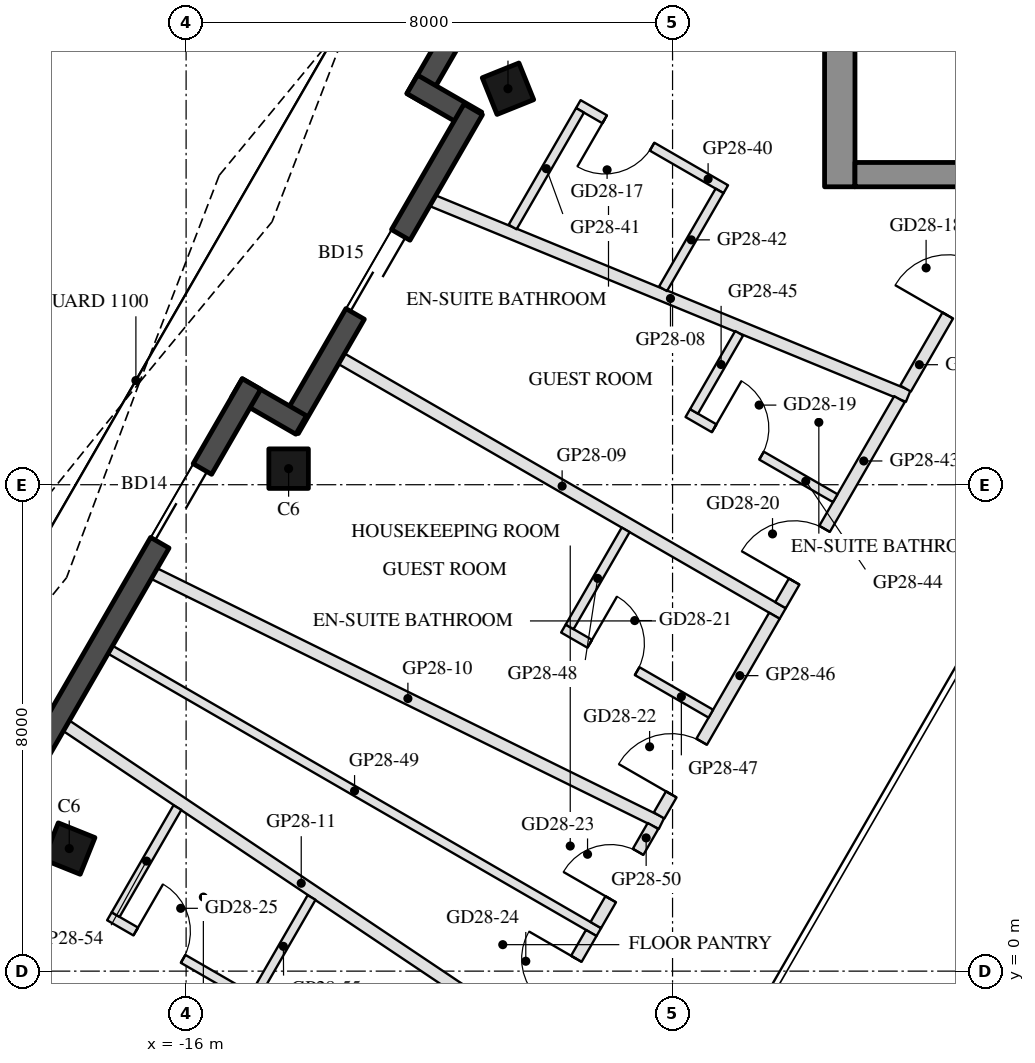
"""IFC4 building model, lengths in metres.
Left out: names, types, materials, properties, quantities, classifications, styles, units other than length and angle.
Written with IfcOpenShell. Run it as: python <this file> out.ifc"""

import sys

from ifc_helpers import new_model, si_unit, direction, frame, frame_2d, origin, origin_2d, place, context, subcontext, project, spatial, rectangle, hollow_rectangle, extrude, boolean, halfspace, element, fill, save


model = new_model("IFC4")
c1 = context("Model", 3, precision=1e-05, world=origin(), true_north=direction((0.0, 1.0)))
c2 = subcontext(c1, "Body", "Model", "MODEL_VIEW")
j1 = project(units=[si_unit("LENGTHUNIT", "METRE"), si_unit("PLANEANGLEUNIT", "RADIAN")], contexts=[c1])
p1 = place(None, origin())
s1 = spatial("IfcSite", under=j1, at=p1, CompositionType="ELEMENT")
p2 = place(p1, origin())
s2 = spatial("IfcBuilding", under=s1, at=p2, CompositionType="ELEMENT")
p3 = place(p2, frame((0.0, 0.0, 287.4)))
s3 = spatial("IfcBuildingStorey", under=s2, at=p3, CompositionType="ELEMENT", Elevation=287.4)
p4 = place(p3, frame((-10.707, 14.513, 0.0), z_axis=(0.100511564979, -0.128308480942, 0.986627771261), x_axis=(0.503128985572, 0.862066140583, 0.060853867073)))
e1 = element("IfcColumn", 1, at=p4, inside=s3, PredefinedType="COLUMN", context=c2, shape_type="SweptSolid", body=[
    boolean("DIFFERENCE", boolean("DIFFERENCE", extrude(hollow_rectangle(XDim=0.65, YDim=0.65, WallThickness=0.03, at=origin_2d()), origin(), (0.0, 0.0, 1.0), 3.75), halfspace(frame((0.0, 0.0, 0.04), z_axis=(0.0, 0.0, 1.0), x_axis=(1.0, 0.0, 0.0)), True)), halfspace(frame((0.0, 0.0, 3.711), z_axis=(0.0, 0.0, 1.0), x_axis=(1.0, 0.0, 0.0)), False)),
])
p5 = place(p3, frame((-14.314, 8.264, 0.0), z_axis=(0.13115563542, -0.07578460883, 0.988460870425), x_axis=(0.500216662803, 0.86590027717, 1.5862574e-05)))
e2 = element("IfcColumn", 2, at=p5, inside=s3, PredefinedType="COLUMN", context=c2, shape_type="SweptSolid", body=[
    boolean("DIFFERENCE", boolean("DIFFERENCE", extrude(hollow_rectangle(XDim=0.65, YDim=0.65, WallThickness=0.03, at=origin_2d()), origin(), (0.0, 0.0, 1.0), 3.743), halfspace(frame((0.0, 0.0, 0.037), z_axis=(0.0, 0.0, 1.0), x_axis=(1.0, 0.0, 0.0)), True)), halfspace(frame((0.0, 0.0, 3.706), z_axis=(0.0, 0.0, 1.0), x_axis=(1.0, 0.0, 0.0)), False)),
])
p6 = place(p3, frame((-17.922, 2.016, 0.0), z_axis=(0.161441555696, -0.022914285325, 0.986616216987), x_axis=(-0.49507293815, -0.866715878813, 0.060879974747)))
e3 = element("IfcColumn", 3, at=p6, inside=s3, PredefinedType="COLUMN", context=c2, shape_type="SweptSolid", body=[
    boolean("DIFFERENCE", boolean("DIFFERENCE", extrude(hollow_rectangle(XDim=0.65, YDim=0.65, WallThickness=0.03, at=origin_2d()), origin(), (0.0, 0.0, 1.0), 3.75), halfspace(frame((0.0, 0.0, 0.04), z_axis=(0.0, 0.0, 1.0), x_axis=(1.0, 0.0, 0.0)), True)), halfspace(frame((0.0, 0.0, 3.711), z_axis=(0.0, 0.0, 1.0), x_axis=(1.0, 0.0, 0.0)), False)),
])
p7 = place(p3, frame((-6.783, 23.76, 0.0), z_axis=(0.0, 0.0, 1.0), x_axis=(-0.500001780095, -0.866024376044, 0.0)))
e4 = element("IfcWall", 4, at=p7, inside=s3, PredefinedType="SOLIDWALL", context=c2, shape_type="SweptSolid", body=[
    extrude(rectangle(XDim=10.87, YDim=0.35, at=frame_2d((5.435, 0.0))), origin(), (0.0, 0.0, 1.0), 3.55),
])
p8 = place(p7, frame((0.381, 0.0, 0.3)))
e5 = element("IfcOpeningElement", 5, at=p8, cuts=e4, PredefinedType="OPENING", context=c2, shape_type="SweptSolid", body=[
    extrude(rectangle(XDim=1.6, YDim=2.65, at=frame_2d((0.8, 1.325))), frame((0.0, 0.185, 0.0), z_axis=(0.0, -1.0, 0.0), x_axis=(1.0, 0.0, 0.0)), (0.0, 0.0, 1.0), 0.37),
])
p9 = place(p7, frame((6.89, 0.0, 0.0)))
e6 = element("IfcOpeningElement", 6, at=p9, cuts=e4, PredefinedType="OPENING", context=c2, shape_type="SweptSolid", body=[
    extrude(rectangle(XDim=2.4, YDim=2.4, at=frame_2d((1.2, 1.2))), frame((0.0, 0.185, 0.0), z_axis=(0.0, -1.0, 0.0), x_axis=(1.0, 0.0, 0.0)), (0.0, 0.0, 1.0), 0.37),
])
p10 = place(p7, frame((3.892, 0.0, 0.3)))
e7 = element("IfcOpeningElement", 7, at=p10, cuts=e4, PredefinedType="OPENING", context=c2, shape_type="SweptSolid", body=[
    extrude(rectangle(XDim=2.6, YDim=2.65, at=frame_2d((1.3, 1.325))), frame((0.0, 0.185, 0.0), z_axis=(0.0, -1.0, 0.0), x_axis=(1.0, 0.0, 0.0)), (0.0, 0.0, 1.0), 0.37),
])
p11 = place(p3, frame((-12.281, 14.585, 0.0), z_axis=(0.0, 0.0, 1.0), x_axis=(0.866005645448, -0.500034220881, 0.0)))
e8 = element("IfcWall", 8, at=p11, inside=s3, PredefinedType="SOLIDWALL", context=c2, shape_type="SweptSolid", body=[
    extrude(rectangle(XDim=1.22, YDim=0.35, at=frame_2d((0.61, 0.0))), origin(), (0.0, 0.0, 1.0), 3.55),
])
p12 = place(p3, frame((-11.278, 14.173, 0.0), z_axis=(0.0, 0.0, 1.0), x_axis=(-0.499985371027, -0.866033849661, 0.0)))
e9 = element("IfcWall", 9, at=p12, inside=s3, PredefinedType="SOLIDWALL", context=c2, shape_type="SweptSolid", body=[
    extrude(rectangle(XDim=6.055, YDim=0.35, at=frame_2d((3.028, 0.0))), origin(), (0.0, 0.0, 1.0), 3.55),
])
p13 = place(p12, frame((2.384, 0.0, 0.0)))
e10 = element("IfcOpeningElement", 10, at=p13, cuts=e9, PredefinedType="OPENING", context=c2, shape_type="SweptSolid", body=[
    extrude(rectangle(XDim=1.5, YDim=2.4, at=frame_2d((0.75, 1.2))), frame((0.0, 0.185, 0.0), z_axis=(0.0, -1.0, 0.0), x_axis=(1.0, 0.0, 0.0)), (0.0, 0.0, 1.0), 0.37),
])
p14 = place(p3, frame((-14.108, 8.982, 0.0), z_axis=(0.0, 0.0, 1.0), x_axis=(-0.866005645448, 0.500034220881, 0.0)))
e11 = element("IfcWall", 11, at=p14, inside=s3, PredefinedType="SOLIDWALL", context=c2, shape_type="SweptSolid", body=[
    extrude(rectangle(XDim=1.22, YDim=0.35, at=frame_2d((0.61, 0.0))), origin(), (0.0, 0.0, 1.0), 3.55),
])
p15 = place(p3, frame((-14.925, 9.656, 0.0), z_axis=(0.0, 0.0, 1.0), x_axis=(-0.500018599098, -0.866014665324, 0.0)))
e12 = element("IfcWall", 12, at=p15, inside=s3, PredefinedType="SOLIDWALL", context=c2, shape_type="SweptSolid", body=[
    extrude(rectangle(XDim=9.015, YDim=0.35, at=frame_2d((4.508, 0.0))), origin(), (0.0, 0.0, 1.0), 3.55),
])
p16 = place(p15, frame((1.614, 0.0, 0.0)))
e13 = element("IfcOpeningElement", 13, at=p16, cuts=e12, PredefinedType="OPENING", context=c2, shape_type="SweptSolid", body=[
    extrude(rectangle(XDim=1.4, YDim=2.4, at=frame_2d((0.7, 1.2))), frame((0.0, 0.185, 0.0), z_axis=(0.0, -1.0, 0.0), x_axis=(1.0, 0.0, 0.0)), (0.0, 0.0, 1.0), 0.37),
])
p17 = place(p3, frame((-5.25, 12.9, 0.0), z_axis=(0.0, 0.0, 1.0), x_axis=(0.0, 1.0, 0.0)))
e14 = element("IfcWall", 14, at=p17, inside=s3, PredefinedType="SHEAR", context=c2, shape_type="SweptSolid", body=[
    extrude(rectangle(XDim=12.129, YDim=0.5, at=frame_2d((6.064, 0.0))), origin(), (0.0, 0.0, 1.0), 3.5),
])
p18 = place(p3, frame((5.0, 13.1, 0.0), z_axis=(0.0, 0.0, 1.0), x_axis=(-1.0, 0.0, 0.0)))
e15 = element("IfcWall", 15, at=p18, inside=s3, PredefinedType="SHEAR", context=c2, shape_type="SweptSolid", body=[
    extrude(rectangle(XDim=10.0, YDim=0.4, at=frame_2d((5.0, 0.0))), origin(), (0.0, 0.0, 1.0), 3.5),
])
p19 = place(p18, frame((3.55, 0.0, 0.0)))
e16 = element("IfcOpeningElement", 16, at=p19, cuts=e15, PredefinedType="OPENING", context=c2, shape_type="SweptSolid", body=[
    extrude(rectangle(XDim=1.1, YDim=2.1, at=frame_2d((0.55, 1.05))), frame((0.0, 0.21, 0.0), z_axis=(0.0, -1.0, 0.0), x_axis=(1.0, 0.0, 0.0)), (0.0, 0.0, 1.0), 0.42),
])
p20 = place(p18, frame((5.85, 0.0, 0.0)))
e17 = element("IfcOpeningElement", 17, at=p20, cuts=e15, PredefinedType="OPENING", context=c2, shape_type="SweptSolid", body=[
    extrude(rectangle(XDim=1.4, YDim=2.1, at=frame_2d((0.7, 1.05))), frame((0.0, 0.21, 0.0), z_axis=(0.0, -1.0, 0.0), x_axis=(1.0, 0.0, 0.0)), (0.0, 0.0, 1.0), 0.42),
])
p21 = place(p3, frame((-11.944, 12.67, 0.0), z_axis=(0.0, 0.0, 1.0), x_axis=(0.924897439871, -0.380216682591, 0.0)))
e18 = element("IfcWall", 18, at=p21, inside=s3, PredefinedType="PARTITIONING", context=c2, shape_type="SweptSolid", body=[
    extrude(rectangle(XDim=8.454, YDim=0.2, at=frame_2d((4.227, 0.0))), origin(), (0.0, 0.0, 1.0), 3.1),
])
p22 = place(p3, frame((-13.444, 10.071, 0.0), z_axis=(0.0, 0.0, 1.0), x_axis=(0.866030795796, -0.499990660646, 0.0)))
e19 = element("IfcWall", 19, at=p22, inside=s3, PredefinedType="PARTITIONING", context=c2, shape_type="SweptSolid", body=[
    extrude(rectangle(XDim=8.379, YDim=0.2, at=frame_2d((4.189, 0.0))), origin(), (0.0, 0.0, 1.0), 3.1),
])
p23 = place(p3, frame((-16.524, 6.538, 0.0), z_axis=(0.0, 0.0, 1.0), x_axis=(0.897120251728, -0.441786434762, 0.0)))
e20 = element("IfcWall", 20, at=p23, inside=s3, PredefinedType="PARTITIONING", context=c2, shape_type="SweptSolid", body=[
    extrude(rectangle(XDim=9.299, YDim=0.2, at=frame_2d((4.649, 0.0))), origin(), (0.0, 0.0, 1.0), 3.1),
])
p24 = place(p3, frame((-17.969, 4.035, 0.0), z_axis=(0.0, 0.0, 1.0), x_axis=(0.830560992963, -0.556927676604, 0.0)))
e21 = element("IfcWall", 21, at=p24, inside=s3, PredefinedType="PARTITIONING", context=c2, shape_type="SweptSolid", body=[
    extrude(rectangle(XDim=9.3, YDim=0.2, at=frame_2d((4.65, 0.0))), origin(), (0.0, 0.0, 1.0), 3.1),
])
p25 = place(p3, frame((-4.167, 9.582, 0.0), z_axis=(0.0, 0.0, 1.0), x_axis=(0.500000579621, 0.86602506914, 0.0)))
e22 = element("IfcWall", 22, at=p25, inside=s3, PredefinedType="PARTITIONING", context=c2, shape_type="SweptSolid", body=[
    extrude(rectangle(XDim=3.774, YDim=0.2, at=frame_2d((1.887, 0.0))), origin(), (0.0, 0.0, 1.0), 3.05),
])
p26 = place(p25, frame((1.387, 0.0, 0.0)))
e23 = element("IfcOpeningElement", 23, at=p26, cuts=e22, PredefinedType="OPENING", context=c2, shape_type="SweptSolid", body=[
    extrude(rectangle(XDim=1.0, YDim=2.1, at=frame_2d((0.5, 1.05))), frame((0.0, 0.11, 0.0), z_axis=(0.0, -1.0, 0.0), x_axis=(1.0, 0.0, 0.0)), (0.0, 0.0, 1.0), 0.22),
])
p27 = place(p3, frame((-7.125, 12.86, 0.0), z_axis=(0.0, 0.0, 1.0), x_axis=(-0.866034573852, 0.49998411664, 0.0)))
e24 = element("IfcWall", 24, at=p27, inside=s3, PredefinedType="PARTITIONING", context=c2, shape_type="SweptSolid", body=[
    extrude(rectangle(XDim=2.8, YDim=0.15, at=frame_2d((1.4, 0.0))), origin(), (0.0, 0.0, 1.0), 3.1),
])
p28 = place(p27, frame((1.4, 0.0, 0.0)))
e25 = element("IfcOpeningElement", 25, at=p28, cuts=e24, PredefinedType="OPENING", context=c2, shape_type="SweptSolid", body=[
    extrude(rectangle(XDim=0.9, YDim=2.1, at=frame_2d((0.45, 1.05))), frame((0.0, 0.085, 0.0), z_axis=(0.0, -1.0, 0.0), x_axis=(1.0, 0.0, 0.0)), (0.0, 0.0, 1.0), 0.17),
])
p29 = place(p3, frame((-9.522, 14.158, 0.0), z_axis=(0.0, 0.0, 1.0), x_axis=(-0.49990681678, -0.866079196458, 0.0)))
e26 = element("IfcWall", 26, at=p29, inside=s3, PredefinedType="PARTITIONING", context=c2, shape_type="SweptSolid", body=[
    extrude(rectangle(XDim=2.216, YDim=0.15, at=frame_2d((1.108, 0.0))), origin(), (0.0, 0.0, 1.0), 3.05),
])
p30 = place(p3, frame((-7.227, 12.833, 0.0), z_axis=(0.0, 0.0, 1.0), x_axis=(-0.500063286585, -0.865988862174, 0.0)))
e27 = element("IfcWall", 27, at=p30, inside=s3, PredefinedType="PARTITIONING", context=c2, shape_type="SweptSolid", body=[
    extrude(rectangle(XDim=1.86, YDim=0.15, at=frame_2d((0.93, 0.0))), origin(), (0.0, 0.0, 1.0), 3.05),
])
p31 = place(p3, frame((-6.225, 6.019, 0.0), z_axis=(0.0, 0.0, 1.0), x_axis=(0.500024943202, 0.866011002341, 0.0)))
e28 = element("IfcWall", 28, at=p31, inside=s3, PredefinedType="PARTITIONING", context=c2, shape_type="SweptSolid", body=[
    extrude(rectangle(XDim=3.912, YDim=0.2, at=frame_2d((1.956, 0.0))), origin(), (0.0, 0.0, 1.0), 3.05),
])
p32 = place(p31, frame((0.449, 0.0, 0.0)))
e29 = element("IfcOpeningElement", 29, at=p32, cuts=e28, PredefinedType="OPENING", context=c2, shape_type="SweptSolid", body=[
    extrude(rectangle(XDim=1.0, YDim=2.1, at=frame_2d((0.5, 1.05))), frame((0.0, 0.11, 0.0), z_axis=(0.0, -1.0, 0.0), x_axis=(1.0, 0.0, 0.0)), (0.0, 0.0, 1.0), 0.22),
])
p33 = place(p3, frame((-7.749, 9.178, 0.0), z_axis=(0.0, 0.0, 1.0), x_axis=(0.866034573852, -0.49998411664, 0.0)))
e30 = element("IfcWall", 30, at=p33, inside=s3, PredefinedType="PARTITIONING", context=c2, shape_type="SweptSolid", body=[
    extrude(rectangle(XDim=2.8, YDim=0.15, at=frame_2d((1.4, 0.0))), origin(), (0.0, 0.0, 1.0), 3.55),
])
p34 = place(p33, frame((0.5, 0.0, 0.0)))
e31 = element("IfcOpeningElement", 31, at=p34, cuts=e30, PredefinedType="OPENING", context=c2, shape_type="SweptSolid", body=[
    extrude(rectangle(XDim=0.9, YDim=2.1, at=frame_2d((0.45, 1.05))), frame((0.0, 0.085, 0.0), z_axis=(0.0, -1.0, 0.0), x_axis=(1.0, 0.0, 0.0)), (0.0, 0.0, 1.0), 0.17),
])
p35 = place(p3, frame((-6.905, 10.491, 0.0), z_axis=(0.0, 0.0, 1.0), x_axis=(-0.499926630096, -0.866067759775, 0.0)))
e32 = element("IfcWall", 32, at=p35, inside=s3, PredefinedType="PARTITIONING", context=c2, shape_type="SweptSolid", body=[
    extrude(rectangle(XDim=1.484, YDim=0.15, at=frame_2d((0.742, 0.0))), origin(), (0.0, 0.0, 1.0), 3.55),
])
p36 = place(p3, frame((-8.221, 2.561, 0.0), z_axis=(0.0, 0.0, 1.0), x_axis=(0.499988034227, 0.866032312117, 0.0)))
e33 = element("IfcWall", 33, at=p36, inside=s3, PredefinedType="PARTITIONING", context=c2, shape_type="SweptSolid", body=[
    extrude(rectangle(XDim=3.793, YDim=0.2, at=frame_2d((1.896, 0.0))), origin(), (0.0, 0.0, 1.0), 3.05),
])
p37 = place(p36, frame((0.4, 0.0, 0.0)))
e34 = element("IfcOpeningElement", 34, at=p37, cuts=e33, PredefinedType="OPENING", context=c2, shape_type="SweptSolid", body=[
    extrude(rectangle(XDim=1.0, YDim=2.1, at=frame_2d((0.5, 1.05))), frame((0.0, 0.11, 0.0), z_axis=(0.0, -1.0, 0.0), x_axis=(1.0, 0.0, 0.0)), (0.0, 0.0, 1.0), 0.22),
])
p38 = place(p3, frame((-9.795, 5.634, 0.0), z_axis=(0.0, 0.0, 1.0), x_axis=(0.866034573852, -0.49998411664, 0.0)))
e35 = element("IfcWall", 35, at=p38, inside=s3, PredefinedType="PARTITIONING", context=c2, shape_type="SweptSolid", body=[
    extrude(rectangle(XDim=2.8, YDim=0.15, at=frame_2d((1.4, 0.0))), origin(), (0.0, 0.0, 1.0), 3.05),
])
p39 = place(p38, frame((0.5, 0.0, 0.0)))
e36 = element("IfcOpeningElement", 36, at=p39, cuts=e35, PredefinedType="OPENING", context=c2, shape_type="SweptSolid", body=[
    extrude(rectangle(XDim=0.9, YDim=2.1, at=frame_2d((0.45, 1.05))), frame((0.0, 0.085, 0.0), z_axis=(0.0, -1.0, 0.0), x_axis=(1.0, 0.0, 0.0)), (0.0, 0.0, 1.0), 0.17),
])
p40 = place(p3, frame((-8.771, 7.258, 0.0), z_axis=(0.0, 0.0, 1.0), x_axis=(-0.50002820729, -0.866009117685, 0.0)))
e37 = element("IfcWall", 37, at=p40, inside=s3, PredefinedType="PARTITIONING", context=c2, shape_type="SweptSolid", body=[
    extrude(rectangle(XDim=1.843, YDim=0.15, at=frame_2d((0.922, 0.0))), origin(), (0.0, 0.0, 1.0), 3.05),
])
p41 = place(p3, frame((-17.246, 5.286, 0.0), z_axis=(0.0, 0.0, 1.0), x_axis=(0.865746766399, -0.500482303853, 0.0)))
e38 = element("IfcWall", 38, at=p41, inside=s3, PredefinedType="PARTITIONING", context=c2, shape_type="SweptSolid", body=[
    extrude(rectangle(XDim=9.279, YDim=0.15, at=frame_2d((4.639, 0.0))), origin(), (0.0, 0.0, 1.0), 3.1),
])
p42 = place(p3, frame((-9.262, 0.758, 0.0), z_axis=(0.0, 0.0, 1.0), x_axis=(0.500074377092, 0.865982457891, 0.0)))
e39 = element("IfcWall", 39, at=p42, inside=s3, PredefinedType="PARTITIONING", context=c2, shape_type="SweptSolid", body=[
    extrude(rectangle(XDim=1.882, YDim=0.2, at=frame_2d((0.941, 0.0))), origin(), (0.0, 0.0, 1.0), 3.05),
])
p43 = place(p42, frame((0.491, 0.0, 0.0)))
e40 = element("IfcOpeningElement", 40, at=p43, cuts=e39, PredefinedType="OPENING", context=c2, shape_type="SweptSolid", body=[
    extrude(rectangle(XDim=0.9, YDim=2.1, at=frame_2d((0.45, 1.05))), frame((0.0, 0.11, 0.0), z_axis=(0.0, -1.0, 0.0), x_axis=(1.0, 0.0, 0.0)), (0.0, 0.0, 1.0), 0.22),
])
p44 = place(p3, frame((-10.278, -1.002, 0.0), z_axis=(0.0, 0.0, 1.0), x_axis=(0.499977061294, 0.866038647048, 0.0)))
e41 = element("IfcWall", 41, at=p44, inside=s3, PredefinedType="PARTITIONING", context=c2, shape_type="SweptSolid", body=[
    extrude(rectangle(XDim=1.881, YDim=0.2, at=frame_2d((0.941, 0.0))), origin(), (0.0, 0.0, 1.0), 3.55),
])
p45 = place(p44, frame((0.491, 0.0, 0.0)))
e42 = element("IfcOpeningElement", 42, at=p45, cuts=e41, PredefinedType="OPENING", context=c2, shape_type="SweptSolid", body=[
    extrude(rectangle(XDim=0.9, YDim=2.1, at=frame_2d((0.45, 1.05))), frame((0.0, 0.11, 0.0), z_axis=(0.0, -1.0, 0.0), x_axis=(1.0, 0.0, 0.0)), (0.0, 0.0, 1.0), 0.22),
])
p46 = place(p3, frame((-17.262, 0.902, 0.0), z_axis=(0.0, 0.0, 1.0), x_axis=(0.866034573852, -0.49998411664, 0.0)))
e43 = element("IfcWall", 43, at=p46, inside=s3, PredefinedType="PARTITIONING", context=c2, shape_type="SweptSolid", body=[
    extrude(rectangle(XDim=2.8, YDim=0.15, at=frame_2d((1.4, 0.0))), origin(), (0.0, 0.0, 1.0), 3.1),
])
p47 = place(p46, frame((0.5, 0.0, 0.0)))
e44 = element("IfcOpeningElement", 44, at=p47, cuts=e43, PredefinedType="OPENING", context=c2, shape_type="SweptSolid", body=[
    extrude(rectangle(XDim=0.9, YDim=2.1, at=frame_2d((0.45, 1.05))), frame((0.0, 0.085, 0.0), z_axis=(0.0, -1.0, 0.0), x_axis=(1.0, 0.0, 0.0)), (0.0, 0.0, 1.0), 0.17),
])
p48 = place(p3, frame((-16.143, 2.69, 0.0), z_axis=(0.0, 0.0, 1.0), x_axis=(-0.500013496215, -0.866017611601, 0.0)))
e45 = element("IfcWall", 45, at=p48, inside=s3, PredefinedType="PARTITIONING", context=c2, shape_type="SweptSolid", body=[
    extrude(rectangle(XDim=2.033, YDim=0.15, at=frame_2d((1.017, 0.0))), origin(), (0.0, 0.0, 1.0), 3.05),
])
p49 = place(p3, frame((-13.937, 1.211, 0.0), z_axis=(0.0, 0.0, 1.0), x_axis=(-0.500003477455, -0.866023396066, 0.0)))
e46 = element("IfcWall", 46, at=p49, inside=s3, PredefinedType="PARTITIONING", context=c2, shape_type="SweptSolid", body=[
    extrude(rectangle(XDim=1.855, YDim=0.15, at=frame_2d((0.927, 0.0))), origin(), (0.0, 0.0, 1.0), 3.05),
])
p50 = place(p13, frame((1.5, 0.0, 0.0), z_axis=(0.0, 0.0, 1.0), x_axis=(-1.0, 0.0, 0.0)))
e47 = element("IfcDoor", 47, at=p50, inside=s3, OperationType="SLIDING_TO_LEFT", PredefinedType="DOOR", context=c2, shape_type="SweptSolid", body=[
    extrude(rectangle(XDim=1.5, YDim=2.4, at=frame_2d((0.75, 1.2))), frame((0.0, 0.025, 0.0), z_axis=(0.0, -1.0, 0.0), x_axis=(1.0, 0.0, 0.0)), (0.0, 0.0, 1.0), 0.05),
])
fill(e10, e47)
p51 = place(p16, frame((1.4, 0.0, 0.0), z_axis=(0.0, 0.0, 1.0), x_axis=(-1.0, 0.0, 0.0)))
e48 = element("IfcDoor", 48, at=p51, inside=s3, OperationType="SLIDING_TO_LEFT", PredefinedType="DOOR", context=c2, shape_type="SweptSolid", body=[
    extrude(rectangle(XDim=1.4, YDim=2.4, at=frame_2d((0.7, 1.2))), frame((0.0, 0.025, 0.0), z_axis=(0.0, -1.0, 0.0), x_axis=(1.0, 0.0, 0.0)), (0.0, 0.0, 1.0), 0.05),
])
fill(e13, e48)
p52 = place(p28, origin())
e49 = element("IfcDoor", 49, at=p52, inside=s3, OperationType="SINGLE_SWING_RIGHT", PredefinedType="DOOR", context=c2, shape_type="SweptSolid", body=[
    extrude(rectangle(XDim=0.9, YDim=2.1, at=frame_2d((0.45, 1.05))), frame((0.0, 0.025, 0.0), z_axis=(0.0, -1.0, 0.0), x_axis=(1.0, 0.0, 0.0)), (0.0, 0.0, 1.0), 0.05),
])
fill(e25, e49)
p53 = place(p26, origin())
e50 = element("IfcDoor", 50, at=p53, inside=s3, OperationType="SINGLE_SWING_LEFT", PredefinedType="DOOR", context=c2, shape_type="SweptSolid", body=[
    extrude(rectangle(XDim=1.0, YDim=2.1, at=frame_2d((0.5, 1.05))), frame((0.0, 0.025, 0.0), z_axis=(0.0, -1.0, 0.0), x_axis=(1.0, 0.0, 0.0)), (0.0, 0.0, 1.0), 0.05),
])
fill(e23, e50)
p54 = place(p34, origin())
e51 = element("IfcDoor", 51, at=p54, inside=s3, OperationType="SINGLE_SWING_LEFT", PredefinedType="DOOR", context=c2, shape_type="SweptSolid", body=[
    extrude(rectangle(XDim=0.9, YDim=2.1, at=frame_2d((0.45, 1.05))), frame((0.0, 0.025, 0.0), z_axis=(0.0, -1.0, 0.0), x_axis=(1.0, 0.0, 0.0)), (0.0, 0.0, 1.0), 0.05),
])
fill(e31, e51)
p55 = place(p32, origin())
e52 = element("IfcDoor", 52, at=p55, inside=s3, OperationType="SINGLE_SWING_LEFT", PredefinedType="DOOR", context=c2, shape_type="SweptSolid", body=[
    extrude(rectangle(XDim=1.0, YDim=2.1, at=frame_2d((0.5, 1.05))), frame((0.0, 0.025, 0.0), z_axis=(0.0, -1.0, 0.0), x_axis=(1.0, 0.0, 0.0)), (0.0, 0.0, 1.0), 0.05),
])
fill(e29, e52)
p56 = place(p39, origin())
e53 = element("IfcDoor", 53, at=p56, inside=s3, OperationType="SINGLE_SWING_LEFT", PredefinedType="DOOR", context=c2, shape_type="SweptSolid", body=[
    extrude(rectangle(XDim=0.9, YDim=2.1, at=frame_2d((0.45, 1.05))), frame((0.0, 0.025, 0.0), z_axis=(0.0, -1.0, 0.0), x_axis=(1.0, 0.0, 0.0)), (0.0, 0.0, 1.0), 0.05),
])
fill(e36, e53)
p57 = place(p37, origin())
e54 = element("IfcDoor", 54, at=p57, inside=s3, OperationType="SINGLE_SWING_LEFT", PredefinedType="DOOR", context=c2, shape_type="SweptSolid", body=[
    extrude(rectangle(XDim=1.0, YDim=2.1, at=frame_2d((0.5, 1.05))), frame((0.0, 0.025, 0.0), z_axis=(0.0, -1.0, 0.0), x_axis=(1.0, 0.0, 0.0)), (0.0, 0.0, 1.0), 0.05),
])
fill(e34, e54)
p58 = place(p43, origin())
e55 = element("IfcDoor", 55, at=p58, inside=s3, OperationType="SINGLE_SWING_LEFT", PredefinedType="DOOR", context=c2, shape_type="SweptSolid", body=[
    extrude(rectangle(XDim=0.9, YDim=2.1, at=frame_2d((0.45, 1.05))), frame((0.0, 0.025, 0.0), z_axis=(0.0, -1.0, 0.0), x_axis=(1.0, 0.0, 0.0)), (0.0, 0.0, 1.0), 0.05),
])
fill(e40, e55)
p59 = place(p45, origin())
e56 = element("IfcDoor", 56, at=p59, inside=s3, OperationType="SINGLE_SWING_RIGHT", PredefinedType="DOOR", context=c2, shape_type="SweptSolid", body=[
    extrude(rectangle(XDim=0.9, YDim=2.1, at=frame_2d((0.45, 1.05))), frame((0.0, 0.025, 0.0), z_axis=(0.0, -1.0, 0.0), x_axis=(1.0, 0.0, 0.0)), (0.0, 0.0, 1.0), 0.05),
])
fill(e42, e56)
p60 = place(p47, origin())
e57 = element("IfcDoor", 57, at=p60, inside=s3, OperationType="SINGLE_SWING_LEFT", PredefinedType="DOOR", context=c2, shape_type="SweptSolid", body=[
    extrude(rectangle(XDim=0.9, YDim=2.1, at=frame_2d((0.45, 1.05))), frame((0.0, 0.025, 0.0), z_axis=(0.0, -1.0, 0.0), x_axis=(1.0, 0.0, 0.0)), (0.0, 0.0, 1.0), 0.05),
])
fill(e44, e57)
save(model, sys.argv[1])
